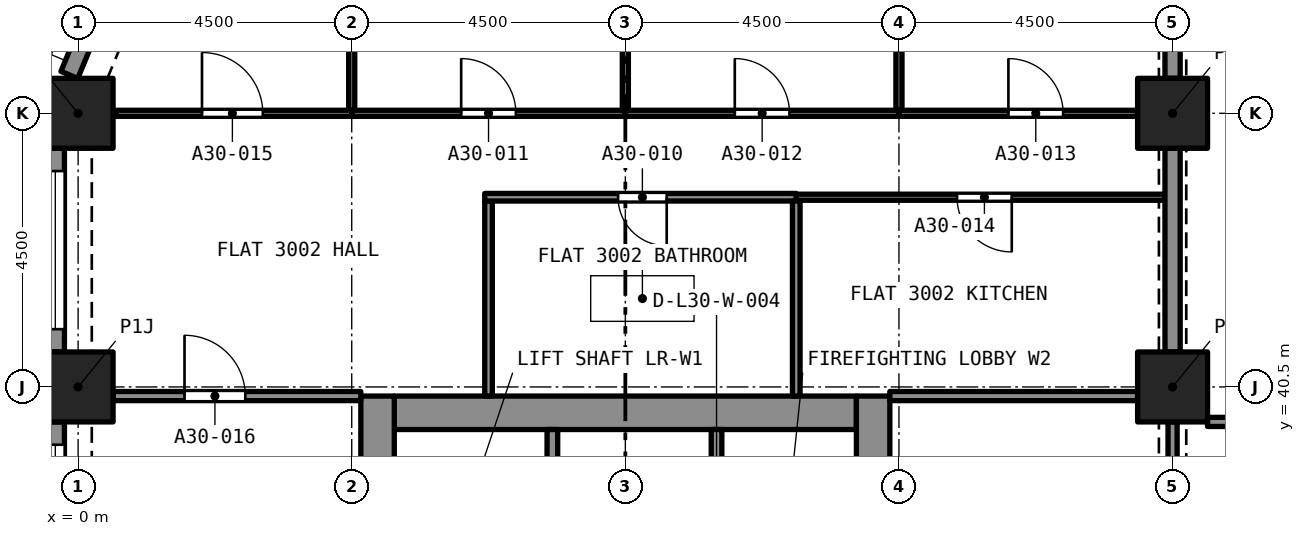
"""IFC4 building model, lengths in metres.
Left out: names, types, materials, properties, quantities, classifications, styles, units other than length and angle.
Written with IfcOpenShell. Run it as: python <this file> out.ifc"""

import sys

from ifc_helpers import new_model, si_unit, direction, frame, frame_2d, origin, origin_2d, place, context, subcontext, project, spatial, rectangle, extrude, element, fill, save


model = new_model("IFC4")
c1 = context("Model", 3, precision=1e-05, world=origin(), true_north=direction((0.0, 1.0)))
c2 = subcontext(c1, "Body", "Model", "MODEL_VIEW")
j1 = project(units=[si_unit("LENGTHUNIT", "METRE"), si_unit("PLANEANGLEUNIT", "RADIAN")], contexts=[c1])
p1 = place(None, origin())
s1 = spatial("IfcSite", under=j1, at=p1, CompositionType="ELEMENT")
p2 = place(p1, origin())
s2 = spatial("IfcBuilding", under=s1, at=p2, CompositionType="ELEMENT")
p3 = place(p2, frame((0.0, 0.0, 108.8)))
s3 = spatial("IfcBuildingStorey", under=s2, at=p3, CompositionType="ELEMENT", Elevation=108.8)
for number, where, z_axis, x_axis in (
    (1, (0.0, 40.5, 0.0), (0.0, 0.0, 1.0), (1.0, 0.0, 0.0)),
    (2, (18.0, 40.5, 0.0), (0.0, 0.0, 1.0), (1.0, 0.0, 0.0)),
    (3, (0.0, 45.0, 0.0), (0.0, 0.0, 1.0), (1.0, 0.0, 0.0)),
    (4, (18.0, 45.0, 0.0), (0.0, 0.0, 1.0), (1.0, 0.0, 0.0)),
):
    element("IfcColumn", number, at=place(p3, frame(where, z_axis=z_axis, x_axis=x_axis)), inside=s3, PredefinedType="COLUMN", context=c2, shape_type="SweptSolid", body=[
        extrude(rectangle(XDim=1.15, YDim=1.15, at=origin_2d()), origin(), (0.0, 0.0, 1.0), 3.2),
    ])
p4 = place(p3, frame((5.2, 40.075, 0.0), z_axis=(0.0, 0.0, 1.0), x_axis=(1.0, 0.0, 0.0)))
e5 = element("IfcWall", 5, at=p4, inside=s3, PredefinedType="SOLIDWALL", context=c2, shape_type="SweptSolid", body=[
    extrude(rectangle(XDim=7.6, YDim=0.55, at=frame_2d((3.8, 0.0))), origin(), (0.0, 0.0, 1.0), 3.2),
])
p5 = place(p3, frame((4.925, 27.15, 0.0), z_axis=(0.0, 0.0, 1.0), x_axis=(0.0, 1.0, 0.0)))
e6 = element("IfcWall", 6, at=p5, inside=s3, PredefinedType="SOLIDWALL", context=c2, shape_type="SweptSolid", body=[
    extrude(rectangle(XDim=13.2, YDim=0.55, at=frame_2d((6.6, 0.0))), origin(), (0.0, 0.0, 1.0), 3.2),
])
p6 = place(p5, frame((8.8, 0.0, 0.0)))
e7 = element("IfcOpeningElement", 7, at=p6, cuts=e6, PredefinedType="OPENING", context=c2, shape_type="SweptSolid", body=[
    extrude(rectangle(XDim=1.2, YDim=2.1, at=frame_2d((0.6, 1.05))), frame((0.0, 0.285, 0.0), z_axis=(0.0, -1.0, 0.0), x_axis=(1.0, 0.0, 0.0)), (0.0, 0.0, 1.0), 0.57),
])
p7 = place(p3, frame((13.075, 27.15, 0.0), z_axis=(0.0, 0.0, 1.0), x_axis=(0.0, 1.0, 0.0)))
e8 = element("IfcWall", 8, at=p7, inside=s3, PredefinedType="SOLIDWALL", context=c2, shape_type="SweptSolid", body=[
    extrude(rectangle(XDim=13.2, YDim=0.55, at=frame_2d((6.6, 0.0))), origin(), (0.0, 0.0, 1.0), 3.2),
])
p8 = place(p7, frame((10.95, 0.0, 0.0)))
e9 = element("IfcOpeningElement", 9, at=p8, cuts=e8, PredefinedType="OPENING", context=c2, shape_type="SweptSolid", body=[
    extrude(rectangle(XDim=1.1, YDim=2.1, at=frame_2d((0.55, 1.05))), frame((0.0, 0.285, 0.0), z_axis=(0.0, -1.0, 0.0), x_axis=(1.0, 0.0, 0.0)), (0.0, 0.0, 1.0), 0.57),
])
p9 = place(p7, frame((8.8, 0.0, 0.0)))
e10 = element("IfcOpeningElement", 10, at=p9, cuts=e8, PredefinedType="OPENING", context=c2, shape_type="SweptSolid", body=[
    extrude(rectangle(XDim=1.2, YDim=2.1, at=frame_2d((0.6, 1.05))), frame((0.0, 0.285, 0.0), z_axis=(0.0, -1.0, 0.0), x_axis=(1.0, 0.0, 0.0)), (0.0, 0.0, 1.0), 0.57),
])
p10 = place(p3, frame((-0.144, 45.632, 0.0), z_axis=(0.0, 0.0, 1.0), x_axis=(0.382723818695, 0.923862802911, 0.0)))
e11 = element("IfcWall", 11, at=p10, inside=s3, PredefinedType="SOLIDWALL", context=c2, shape_type="SweptSolid", body=[
    extrude(rectangle(XDim=2.164, YDim=0.3, at=frame_2d((1.082, 0.0))), origin(), (0.0, 0.0, 1.0), 3.2),
])
p11 = place(p10, frame((0.493, 0.0, 0.45)))
e12 = element("IfcOpeningElement", 12, at=p11, cuts=e11, PredefinedType="OPENING", context=c2, shape_type="SweptSolid", body=[
    extrude(rectangle(XDim=1.4, YDim=1.95, at=frame_2d((0.7, 0.975))), frame((0.0, 0.16, 0.0), z_axis=(0.0, -1.0, 0.0), x_axis=(1.0, 0.0, 0.0)), (0.0, 0.0, 1.0), 0.32),
])
p12 = place(p3, frame((-0.375, 41.075, 0.0), z_axis=(0.0, 0.0, 1.0), x_axis=(0.0, 1.0, 0.0)))
e13 = element("IfcWall", 13, at=p12, inside=s3, PredefinedType="SOLIDWALL", context=c2, shape_type="SweptSolid", body=[
    extrude(rectangle(XDim=3.35, YDim=0.3, at=frame_2d((1.675, 0.0))), origin(), (0.0, 0.0, 1.0), 3.2),
])
p13 = place(p12, frame((0.375, 0.0, 0.45)))
e14 = element("IfcOpeningElement", 14, at=p13, cuts=e13, PredefinedType="OPENING", context=c2, shape_type="SweptSolid", body=[
    extrude(rectangle(XDim=2.6, YDim=1.95, at=frame_2d((1.3, 0.975))), frame((0.0, 0.16, 0.0), z_axis=(0.0, -1.0, 0.0), x_axis=(1.0, 0.0, 0.0)), (0.0, 0.0, 1.0), 0.32),
])
p14 = place(p3, frame((-0.375, 36.575, 0.0), z_axis=(0.0, 0.0, 1.0), x_axis=(0.0, 1.0, 0.0)))
e15 = element("IfcWall", 15, at=p14, inside=s3, PredefinedType="SOLIDWALL", context=c2, shape_type="SweptSolid", body=[
    extrude(rectangle(XDim=3.35, YDim=0.3, at=frame_2d((1.675, 0.0))), origin(), (0.0, 0.0, 1.0), 3.2),
])
p15 = place(p14, frame((0.375, 0.0, 0.45)))
e16 = element("IfcOpeningElement", 16, at=p15, cuts=e15, PredefinedType="OPENING", context=c2, shape_type="SweptSolid", body=[
    extrude(rectangle(XDim=2.6, YDim=1.95, at=frame_2d((1.3, 0.975))), frame((0.0, 0.16, 0.0), z_axis=(0.0, -1.0, 0.0), x_axis=(1.0, 0.0, 0.0)), (0.0, 0.0, 1.0), 0.32),
])
p16 = place(p3, frame((6.75, 40.35, 0.0), z_axis=(0.0, 0.0, 1.0), x_axis=(0.0, 1.0, 0.0)))
e17 = element("IfcWall", 17, at=p16, inside=s3, PredefinedType="PARTITIONING", context=c2, shape_type="SweptSolid", body=[
    extrude(rectangle(XDim=3.208, YDim=0.125, at=frame_2d((1.604, 0.0))), origin(), (0.0, 0.0, 1.0), 2.9),
])
p17 = place(p3, frame((11.811, 43.62, 0.0), z_axis=(0.0, 0.0, 1.0), x_axis=(-1.0, 0.0, 0.0)))
e18 = element("IfcWall", 18, at=p17, inside=s3, PredefinedType="PARTITIONING", context=c2, shape_type="SweptSolid", body=[
    extrude(rectangle(XDim=5.123, YDim=0.125, at=frame_2d((2.562, 0.0))), origin(), (0.0, 0.0, 1.0), 2.9),
])
p18 = place(p17, frame((2.13, 0.0, 0.0)))
e19 = element("IfcOpeningElement", 19, at=p18, cuts=e18, PredefinedType="OPENING", context=c2, shape_type="SweptSolid", body=[
    extrude(rectangle(XDim=0.8, YDim=2.1, at=frame_2d((0.4, 1.05))), frame((0.0, 0.073, 0.0), z_axis=(0.0, -1.0, 0.0), x_axis=(1.0, 0.0, 0.0)), (0.0, 0.0, 1.0), 0.145),
])
p19 = place(p3, frame((11.811, 40.35, 0.0), z_axis=(0.0, 0.0, 1.0), x_axis=(0.0, 1.0, 0.0)))
e20 = element("IfcWall", 20, at=p19, inside=s3, PredefinedType="PARTITIONING", context=c2, shape_type="SweptSolid", body=[
    extrude(rectangle(XDim=3.208, YDim=0.125, at=frame_2d((1.604, 0.0))), origin(), (0.0, 0.0, 1.0), 2.9),
])
p20 = place(p3, frame((9.0, 45.05, 0.0), z_axis=(0.0, 0.0, 1.0), x_axis=(0.0, 1.0, 0.0)))
e21 = element("IfcWall", 21, at=p20, inside=s3, PredefinedType="PARTITIONING", context=c2, shape_type="SweptSolid", body=[
    extrude(rectangle(XDim=3.875, YDim=0.1, at=frame_2d((1.938, 0.0))), origin(), (0.0, 0.0, 1.0), 2.9),
])
p21 = place(p3, frame((4.5, 45.0, 0.0), z_axis=(0.0, 0.0, 1.0), x_axis=(1.0, 0.0, 0.0)))
e22 = element("IfcWall", 22, at=p21, inside=s3, PredefinedType="PARTITIONING", context=c2, shape_type="SweptSolid", body=[
    extrude(rectangle(XDim=4.5, YDim=0.1, at=frame_2d((2.25, 0.0))), origin(), (0.0, 0.0, 1.0), 2.9),
])
p22 = place(p21, frame((1.8, 0.0, 0.0)))
e23 = element("IfcOpeningElement", 23, at=p22, cuts=e22, PredefinedType="OPENING", context=c2, shape_type="SweptSolid", body=[
    extrude(rectangle(XDim=0.9, YDim=2.1, at=frame_2d((0.45, 1.05))), frame((0.0, 0.06, 0.0), z_axis=(0.0, -1.0, 0.0), x_axis=(1.0, 0.0, 0.0)), (0.0, 0.0, 1.0), 0.12),
])
p23 = place(p3, frame((4.5, 45.05, 0.0), z_axis=(0.0, 0.0, 1.0), x_axis=(0.0, 1.0, 0.0)))
e24 = element("IfcWall", 24, at=p23, inside=s3, PredefinedType="PARTITIONING", context=c2, shape_type="SweptSolid", body=[
    extrude(rectangle(XDim=3.828, YDim=0.1, at=frame_2d((1.914, 0.0))), origin(), (0.0, 0.0, 1.0), 2.9),
])
p24 = place(p3, frame((13.5, 45.05, 0.0), z_axis=(0.0, 0.0, 1.0), x_axis=(0.0, 1.0, 0.0)))
e25 = element("IfcWall", 25, at=p24, inside=s3, PredefinedType="PARTITIONING", context=c2, shape_type="SweptSolid", body=[
    extrude(rectangle(XDim=3.875, YDim=0.1, at=frame_2d((1.938, 0.0))), origin(), (0.0, 0.0, 1.0), 2.9),
])
p25 = place(p3, frame((9.0, 45.0, 0.0), z_axis=(0.0, 0.0, 1.0), x_axis=(1.0, 0.0, 0.0)))
e26 = element("IfcWall", 26, at=p25, inside=s3, PredefinedType="PARTITIONING", context=c2, shape_type="SweptSolid", body=[
    extrude(rectangle(XDim=4.5, YDim=0.1, at=frame_2d((2.25, 0.0))), origin(), (0.0, 0.0, 1.0), 2.9),
])
p26 = place(p25, frame((1.8, 0.0, 0.0)))
e27 = element("IfcOpeningElement", 27, at=p26, cuts=e26, PredefinedType="OPENING", context=c2, shape_type="SweptSolid", body=[
    extrude(rectangle(XDim=0.9, YDim=2.1, at=frame_2d((0.45, 1.05))), frame((0.0, 0.06, 0.0), z_axis=(0.0, -1.0, 0.0), x_axis=(1.0, 0.0, 0.0)), (0.0, 0.0, 1.0), 0.12),
])
p27 = place(p3, frame((13.5, 45.0, 0.0), z_axis=(0.0, 0.0, 1.0), x_axis=(1.0, 0.0, 0.0)))
e28 = element("IfcWall", 28, at=p27, inside=s3, PredefinedType="PARTITIONING", context=c2, shape_type="SweptSolid", body=[
    extrude(rectangle(XDim=3.925, YDim=0.1, at=frame_2d((1.962, 0.0))), origin(), (0.0, 0.0, 1.0), 2.9),
])
p28 = place(p27, frame((1.8, 0.0, 0.0)))
e29 = element("IfcOpeningElement", 29, at=p28, cuts=e28, PredefinedType="OPENING", context=c2, shape_type="SweptSolid", body=[
    extrude(rectangle(XDim=0.9, YDim=2.1, at=frame_2d((0.45, 1.05))), frame((0.0, 0.06, 0.0), z_axis=(0.0, -1.0, 0.0), x_axis=(1.0, 0.0, 0.0)), (0.0, 0.0, 1.0), 0.12),
])
p29 = place(p3, frame((18.0, 45.575, 0.0), z_axis=(0.0, 0.0, 1.0), x_axis=(0.0, 1.0, 0.0)))
e30 = element("IfcWall", 30, at=p29, inside=s3, PredefinedType="PARTITIONING", context=c2, shape_type="SweptSolid", body=[
    extrude(rectangle(XDim=3.35, YDim=0.25, at=frame_2d((1.675, 0.0))), origin(), (0.0, 0.0, 1.0), 2.38),
])
p30 = place(p3, frame((17.875, 43.62, 0.0), z_axis=(0.0, 0.0, 1.0), x_axis=(-1.0, 0.0, 0.0)))
e31 = element("IfcWall", 31, at=p30, inside=s3, PredefinedType="PARTITIONING", context=c2, shape_type="SweptSolid", body=[
    extrude(rectangle(XDim=6.064, YDim=0.1, at=frame_2d((3.032, 0.0))), origin(), (0.0, 0.0, 1.0), 2.9),
])
p31 = place(p30, frame((2.52, 0.0, 0.0)))
e32 = element("IfcOpeningElement", 32, at=p31, cuts=e31, PredefinedType="OPENING", context=c2, shape_type="SweptSolid", body=[
    extrude(rectangle(XDim=0.9, YDim=2.1, at=frame_2d((0.45, 1.05))), frame((0.0, 0.06, 0.0), z_axis=(0.0, -1.0, 0.0), x_axis=(1.0, 0.0, 0.0)), (0.0, 0.0, 1.0), 0.12),
])
p32 = place(p3, frame((0.622, 45.0, 0.0), z_axis=(0.0, 0.0, 1.0), x_axis=(1.0, 0.0, 0.0)))
e33 = element("IfcWall", 33, at=p32, inside=s3, PredefinedType="PARTITIONING", context=c2, shape_type="SweptSolid", body=[
    extrude(rectangle(XDim=3.878, YDim=0.1, at=frame_2d((1.939, 0.0))), origin(), (0.0, 0.0, 1.0), 2.9),
])
p33 = place(p32, frame((1.415, 0.0, 0.0)))
e34 = element("IfcOpeningElement", 34, at=p33, cuts=e33, PredefinedType="OPENING", context=c2, shape_type="SweptSolid", body=[
    extrude(rectangle(XDim=1.0, YDim=2.1, at=frame_2d((0.5, 1.05))), frame((0.0, 0.06, 0.0), z_axis=(0.0, -1.0, 0.0), x_axis=(1.0, 0.0, 0.0)), (0.0, 0.0, 1.0), 0.12),
])
p34 = place(p3, frame((0.575, 40.35, 0.0), z_axis=(0.0, 0.0, 1.0), x_axis=(1.0, 0.0, 0.0)))
e35 = element("IfcWall", 35, at=p34, inside=s3, PredefinedType="PARTITIONING", context=c2, shape_type="SweptSolid", body=[
    extrude(rectangle(XDim=4.075, YDim=0.15, at=frame_2d((2.038, 0.0))), origin(), (0.0, 0.0, 1.0), 2.9),
])
p35 = place(p34, frame((1.175, 0.0, 0.0)))
e36 = element("IfcOpeningElement", 36, at=p35, cuts=e35, PredefinedType="OPENING", context=c2, shape_type="SweptSolid", body=[
    extrude(rectangle(XDim=1.0, YDim=2.1, at=frame_2d((0.5, 1.05))), frame((0.0, 0.085, 0.0), z_axis=(0.0, -1.0, 0.0), x_axis=(1.0, 0.0, 0.0)), (0.0, 0.0, 1.0), 0.17),
])
p36 = place(p3, frame((18.0, 41.075, 0.0), z_axis=(0.0, 0.0, 1.0), x_axis=(0.0, 1.0, 0.0)))
e37 = element("IfcWall", 37, at=p36, inside=s3, PredefinedType="PARTITIONING", context=c2, shape_type="SweptSolid", body=[
    extrude(rectangle(XDim=3.35, YDim=0.25, at=frame_2d((1.675, 0.0))), origin(), (0.0, 0.0, 1.0), 2.38),
])
p37 = place(p3, frame((13.35, 40.35, 0.0), z_axis=(0.0, 0.0, 1.0), x_axis=(1.0, 0.0, 0.0)))
e38 = element("IfcWall", 38, at=p37, inside=s3, PredefinedType="PARTITIONING", context=c2, shape_type="SweptSolid", body=[
    extrude(rectangle(XDim=4.075, YDim=0.15, at=frame_2d((2.038, 0.0))), origin(), (0.0, 0.0, 1.0), 2.9),
])
p38 = place(p3, frame((18.575, 39.925, 0.0), z_axis=(0.0, 0.0, 1.0), x_axis=(1.0, 0.0, 0.0)))
e39 = element("IfcWall", 39, at=p38, inside=s3, PredefinedType="PARTITIONING", context=c2, shape_type="SweptSolid", body=[
    extrude(rectangle(XDim=8.425, YDim=0.15, at=frame_2d((4.212, 0.0))), origin(), (0.0, 0.0, 1.0), 2.75),
])
p39 = place(p38, frame((3.425, 0.0, 0.0)))
e40 = element("IfcOpeningElement", 40, at=p39, cuts=e39, PredefinedType="OPENING", context=c2, shape_type="SweptSolid", body=[
    extrude(rectangle(XDim=1.0, YDim=2.1, at=frame_2d((0.5, 1.05))), frame((0.0, 0.085, 0.0), z_axis=(0.0, -1.0, 0.0), x_axis=(1.0, 0.0, 0.0)), (0.0, 0.0, 1.0), 0.17),
])
p40 = place(p3, frame((18.0, 39.925, 0.0), z_axis=(0.0, 0.0, 1.0), x_axis=(0.0, -1.0, 0.0)))
e41 = element("IfcWall", 41, at=p40, inside=s3, PredefinedType="PARTITIONING", context=c2, shape_type="SweptSolid", body=[
    extrude(rectangle(XDim=3.35, YDim=0.15, at=frame_2d((1.675, 0.0))), origin(), (0.0, 0.0, 1.0), 2.38),
])
p41 = place(p40, frame((1.075, 0.0, 0.0)))
e42 = element("IfcOpeningElement", 42, at=p41, cuts=e41, PredefinedType="OPENING", context=c2, shape_type="SweptSolid", body=[
    extrude(rectangle(XDim=1.2, YDim=2.1, at=frame_2d((0.6, 1.05))), frame((0.0, 0.085, 0.0), z_axis=(0.0, -1.0, 0.0), x_axis=(1.0, 0.0, 0.0)), (0.0, 0.0, 1.0), 0.17),
])
p42 = place(p3, frame((7.8, 37.5, 0.0), z_axis=(0.0, 0.0, 1.0), x_axis=(0.0, 1.0, 0.0)))
e43 = element("IfcWall", 43, at=p42, inside=s3, PredefinedType="SOLIDWALL", context=c2, shape_type="SweptSolid", body=[
    extrude(rectangle(XDim=2.3, YDim=0.175, at=frame_2d((1.15, 0.0))), origin(), (0.0, 0.0, 1.0), 2.9),
])
p43 = place(p3, frame((10.5, 37.5, 0.0), z_axis=(0.0, 0.0, 1.0), x_axis=(0.0, 1.0, 0.0)))
e44 = element("IfcWall", 44, at=p43, inside=s3, PredefinedType="SOLIDWALL", context=c2, shape_type="SweptSolid", body=[
    extrude(rectangle(XDim=2.3, YDim=0.175, at=frame_2d((1.15, 0.0))), origin(), (0.0, 0.0, 1.0), 2.9),
])
p44 = place(p43, frame((0.65, 0.0, 0.0)))
e45 = element("IfcOpeningElement", 45, at=p44, cuts=e44, PredefinedType="OPENING", context=c2, shape_type="SweptSolid", body=[
    extrude(rectangle(XDim=1.0, YDim=2.1, at=frame_2d((0.5, 1.05))), frame((0.0, 0.097, 0.0), z_axis=(0.0, -1.0, 0.0), x_axis=(1.0, 0.0, 0.0)), (0.0, 0.0, 1.0), 0.195),
])
p45 = place(p13, origin())
e46 = element("IfcWindow", 46, at=p45, inside=s3, PartitioningType="SINGLE_PANEL", PredefinedType="WINDOW", context=c2, shape_type="SweptSolid", body=[
    extrude(rectangle(XDim=2.6, YDim=1.95, at=frame_2d((1.3, 0.975))), frame((0.0, 0.03, 0.0), z_axis=(0.0, -1.0, 0.0), x_axis=(1.0, 0.0, 0.0)), (0.0, 0.0, 1.0), 0.06),
])
fill(e14, e46)
p46 = place(p15, origin())
e47 = element("IfcWindow", 47, at=p46, inside=s3, PartitioningType="SINGLE_PANEL", PredefinedType="WINDOW", context=c2, shape_type="SweptSolid", body=[
    extrude(rectangle(XDim=2.6, YDim=1.95, at=frame_2d((1.3, 0.975))), frame((0.0, 0.03, 0.0), z_axis=(0.0, -1.0, 0.0), x_axis=(1.0, 0.0, 0.0)), (0.0, 0.0, 1.0), 0.06),
])
fill(e16, e47)
p47 = place(p18, origin())
e48 = element("IfcDoor", 48, at=p47, inside=s3, OperationType="SINGLE_SWING_LEFT", PredefinedType="DOOR", context=c2, shape_type="SweptSolid", body=[
    extrude(rectangle(XDim=0.8, YDim=2.1, at=frame_2d((0.4, 1.05))), frame((0.0, 0.025, 0.0), z_axis=(0.0, -1.0, 0.0), x_axis=(1.0, 0.0, 0.0)), (0.0, 0.0, 1.0), 0.05),
])
fill(e19, e48)
p48 = place(p22, origin())
e49 = element("IfcDoor", 49, at=p48, inside=s3, OperationType="SINGLE_SWING_RIGHT", PredefinedType="DOOR", context=c2, shape_type="SweptSolid", body=[
    extrude(rectangle(XDim=0.9, YDim=2.1, at=frame_2d((0.45, 1.05))), frame((0.0, 0.025, 0.0), z_axis=(0.0, -1.0, 0.0), x_axis=(1.0, 0.0, 0.0)), (0.0, 0.0, 1.0), 0.05),
])
fill(e23, e49)
p49 = place(p26, origin())
e50 = element("IfcDoor", 50, at=p49, inside=s3, OperationType="SINGLE_SWING_LEFT", PredefinedType="DOOR", context=c2, shape_type="SweptSolid", body=[
    extrude(rectangle(XDim=0.9, YDim=2.1, at=frame_2d((0.45, 1.05))), frame((0.0, 0.025, 0.0), z_axis=(0.0, -1.0, 0.0), x_axis=(1.0, 0.0, 0.0)), (0.0, 0.0, 1.0), 0.05),
])
fill(e27, e50)
p50 = place(p28, origin())
e51 = element("IfcDoor", 51, at=p50, inside=s3, OperationType="SINGLE_SWING_RIGHT", PredefinedType="DOOR", context=c2, shape_type="SweptSolid", body=[
    extrude(rectangle(XDim=0.9, YDim=2.1, at=frame_2d((0.45, 1.05))), frame((0.0, 0.025, 0.0), z_axis=(0.0, -1.0, 0.0), x_axis=(1.0, 0.0, 0.0)), (0.0, 0.0, 1.0), 0.05),
])
fill(e29, e51)
p51 = place(p31, origin())
e52 = element("IfcDoor", 52, at=p51, inside=s3, OperationType="SINGLE_SWING_LEFT", PredefinedType="DOOR", context=c2, shape_type="SweptSolid", body=[
    extrude(rectangle(XDim=0.9, YDim=2.1, at=frame_2d((0.45, 1.05))), frame((0.0, 0.025, 0.0), z_axis=(0.0, -1.0, 0.0), x_axis=(1.0, 0.0, 0.0)), (0.0, 0.0, 1.0), 0.05),
])
fill(e32, e52)
p52 = place(p33, origin())
e53 = element("IfcDoor", 53, at=p52, inside=s3, OperationType="SINGLE_SWING_LEFT", PredefinedType="DOOR", context=c2, shape_type="SweptSolid", body=[
    extrude(rectangle(XDim=1.0, YDim=2.1, at=frame_2d((0.5, 1.05))), frame((0.0, 0.025, 0.0), z_axis=(0.0, -1.0, 0.0), x_axis=(1.0, 0.0, 0.0)), (0.0, 0.0, 1.0), 0.05),
])
fill(e34, e53)
p53 = place(p35, origin())
e54 = element("IfcDoor", 54, at=p53, inside=s3, OperationType="SINGLE_SWING_LEFT", PredefinedType="DOOR", context=c2, shape_type="SweptSolid", body=[
    extrude(rectangle(XDim=1.0, YDim=2.1, at=frame_2d((0.5, 1.05))), frame((0.0, 0.025, 0.0), z_axis=(0.0, -1.0, 0.0), x_axis=(1.0, 0.0, 0.0)), (0.0, 0.0, 1.0), 0.05),
])
fill(e36, e54)
save(model, sys.argv[1])
